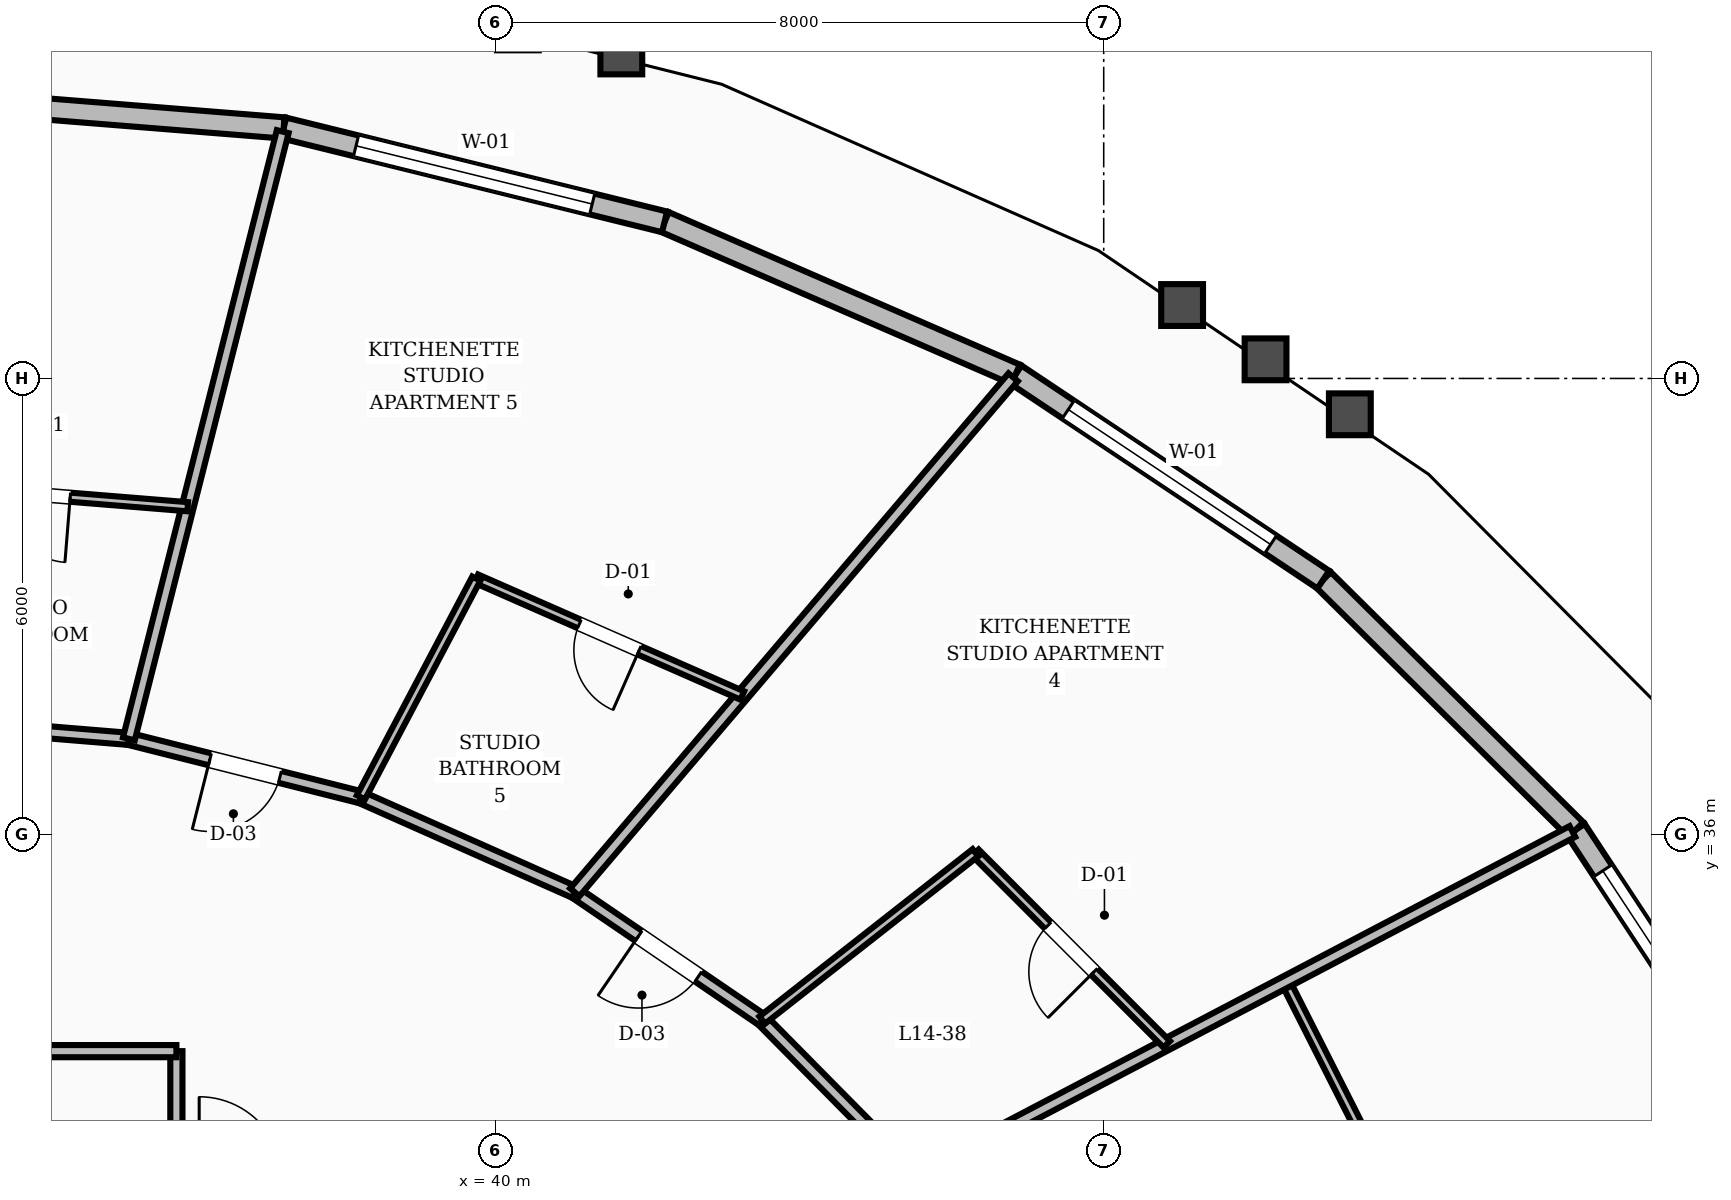
"""IFC4 building model, lengths in metres.
Left out: names, types, materials, properties, quantities, classifications, styles, units other than length and angle.
Written with IfcOpenShell. Run it as: python <this file> out.ifc"""

import sys

from ifc_helpers import new_model, si_unit, direction, frame, frame_2d, origin, place, context, subcontext, project, spatial, rectangle, extrude, element, fill, save


model = new_model("IFC4")
c1 = context("Model", 3, precision=1e-05, world=origin(), true_north=direction((0.0, 1.0)))
c2 = subcontext(c1, "Body", "Model", "MODEL_VIEW")
j1 = project(units=[si_unit("LENGTHUNIT", "METRE"), si_unit("PLANEANGLEUNIT", "RADIAN")], contexts=[c1])
p1 = place(None, origin())
s1 = spatial("IfcSite", under=j1, at=p1, CompositionType="ELEMENT")
p2 = place(p1, origin())
s2 = spatial("IfcBuilding", under=s1, at=p2, CompositionType="ELEMENT")
p3 = place(p2, frame((0.0, 0.0, 59.2)))
s3 = spatial("IfcBuildingStorey", under=s2, at=p3, CompositionType="ELEMENT", Elevation=59.2)
p4 = place(p3, frame((56.679, 32.309, 0.0), z_axis=(0.0, 0.0, 1.0), x_axis=(-0.549434846356, 0.835536563898, 0.0)))
e1 = element("IfcWall", 1, at=p4, inside=s3, PredefinedType="STANDARD", context=c2, shape_type="SweptSolid", body=[
    extrude(rectangle(XDim=4.493, YDim=0.28, at=frame_2d((2.247, 0.0))), origin(), (0.0, 0.0, 1.0), 2.65),
])
p5 = place(p4, frame((0.646, 0.0, 0.8)))
e2 = element("IfcOpeningElement", 2, at=p5, cuts=e1, PredefinedType="OPENING", context=c2, shape_type="SweptSolid", body=[
    extrude(rectangle(XDim=3.2, YDim=1.65, at=frame_2d((1.6, 0.825))), frame((0.0, 0.15, 0.0), z_axis=(0.0, -1.0, 0.0), x_axis=(1.0, 0.0, 0.0)), (0.0, 0.0, 1.0), 0.3),
])
p6 = place(p3, frame((54.211, 36.063, 0.0), z_axis=(0.0, 0.0, 1.0), x_axis=(-0.710492625766, 0.70370464595, 0.0)))
e3 = element("IfcWall", 3, at=p6, inside=s3, PredefinedType="STANDARD", context=c2, shape_type="SweptSolid", body=[
    extrude(rectangle(XDim=4.676, YDim=0.28, at=frame_2d((2.338, 0.0))), origin(), (0.0, 0.0, 1.0), 2.65),
])
p7 = place(p3, frame((50.889, 39.353, 0.0), z_axis=(0.0, 0.0, 1.0), x_axis=(-0.83189587854, 0.5549317501, 0.0)))
e4 = element("IfcWall", 4, at=p7, inside=s3, PredefinedType="STANDARD", context=c2, shape_type="SweptSolid", body=[
    extrude(rectangle(XDim=4.866, YDim=0.28, at=frame_2d((2.433, 0.0))), origin(), (0.0, 0.0, 1.0), 2.65),
])
p8 = place(p7, frame((0.833, 0.0, 0.8)))
e5 = element("IfcOpeningElement", 5, at=p8, cuts=e4, PredefinedType="OPENING", context=c2, shape_type="SweptSolid", body=[
    extrude(rectangle(XDim=3.2, YDim=1.65, at=frame_2d((1.6, 0.825))), frame((0.0, 0.15, 0.0), z_axis=(0.0, -1.0, 0.0), x_axis=(1.0, 0.0, 0.0)), (0.0, 0.0, 1.0), 0.3),
])
p9 = place(p3, frame((46.841, 42.053, 0.0), z_axis=(0.0, 0.0, 1.0), x_axis=(-0.917190263452, 0.398449520804, 0.0)))
e6 = element("IfcWall", 6, at=p9, inside=s3, PredefinedType="STANDARD", context=c2, shape_type="SweptSolid", body=[
    extrude(rectangle(XDim=5.035, YDim=0.28, at=frame_2d((2.518, 0.0))), origin(), (0.0, 0.0, 1.0), 2.65),
])
p10 = place(p3, frame((42.222, 44.06, 0.0), z_axis=(0.0, 0.0, 1.0), x_axis=(-0.970919369657, 0.239406720089, 0.0)))
e7 = element("IfcWall", 7, at=p10, inside=s3, PredefinedType="STANDARD", context=c2, shape_type="SweptSolid", body=[
    extrude(rectangle(XDim=5.161, YDim=0.28, at=frame_2d((2.581, 0.0))), origin(), (0.0, 0.0, 1.0), 2.65),
])
p11 = place(p10, frame((0.981, 0.0, 0.8)))
e8 = element("IfcOpeningElement", 8, at=p11, cuts=e7, PredefinedType="OPENING", context=c2, shape_type="SweptSolid", body=[
    extrude(rectangle(XDim=3.2, YDim=1.65, at=frame_2d((1.6, 0.825))), frame((0.0, 0.15, 0.0), z_axis=(0.0, -1.0, 0.0), x_axis=(1.0, 0.0, 0.0)), (0.0, 0.0, 1.0), 0.3),
])
p12 = place(p3, frame((37.211, 45.295, 0.0), z_axis=(0.0, 0.0, 1.0), x_axis=(-0.996810376731, 0.079806471181, 0.0)))
e9 = element("IfcWall", 9, at=p12, inside=s3, PredefinedType="STANDARD", context=c2, shape_type="SweptSolid", body=[
    extrude(rectangle(XDim=5.228, YDim=0.28, at=frame_2d((2.614, 0.0))), origin(), (0.0, 0.0, 1.0), 2.65),
])
p13 = place(p3, frame((35.8, 31.45, 0.0), z_axis=(0.0, 0.0, 1.0), x_axis=(0.0, 1.0, 0.0)))
e10 = element("IfcWall", 10, at=p13, inside=s3, PredefinedType="SOLIDWALL", context=c2, shape_type="SweptSolid", body=[
    extrude(rectangle(XDim=1.7, YDim=0.16, at=frame_2d((0.85, 0.0))), origin(), (0.0, 0.0, 1.0), 2.61),
])
p14 = place(p3, frame((28.2, 33.15, 0.0), z_axis=(0.0, 0.0, 1.0), x_axis=(1.0, 0.0, 0.0)))
e11 = element("IfcWall", 11, at=p14, inside=s3, PredefinedType="SOLIDWALL", context=c2, shape_type="SweptSolid", body=[
    extrude(rectangle(XDim=7.6, YDim=0.16, at=frame_2d((3.8, 0.0))), origin(), (0.0, 0.0, 1.0), 2.61),
])
p15 = place(p14, frame((3.2, 0.0, 0.0)))
e12 = element("IfcOpeningElement", 12, at=p15, cuts=e11, PredefinedType="OPENING", context=c2, shape_type="SweptSolid", body=[
    extrude(rectangle(XDim=1.2, YDim=2.1, at=frame_2d((0.6, 1.05))), frame((0.0, 0.09, 0.0), z_axis=(0.0, -1.0, 0.0), x_axis=(1.0, 0.0, 0.0)), (0.0, 0.0, 1.0), 0.18),
])
p16 = place(p3, frame((45.531, 31.51, 0.0), z_axis=(0.0, 0.0, 1.0), x_axis=(-0.702811997, 0.711375636969, 0.0)))
e13 = element("IfcWall", 13, at=p16, inside=s3, PredefinedType="SOLIDWALL", context=c2, shape_type="SweptSolid", body=[
    extrude(rectangle(XDim=2.879, YDim=0.16, at=frame_2d((1.44, 0.0))), origin(), (0.0, 0.0, 1.0), 2.61),
])
p17 = place(p3, frame((43.508, 33.559, 0.0), z_axis=(0.0, 0.0, 1.0), x_axis=(-0.826293096206, 0.56324037423, 0.0)))
e14 = element("IfcWall", 14, at=p17, inside=s3, PredefinedType="SOLIDWALL", context=c2, shape_type="SweptSolid", body=[
    extrude(rectangle(XDim=2.985, YDim=0.16, at=frame_2d((1.492, 0.0))), origin(), (0.0, 0.0, 1.0), 2.61),
])
p18 = place(p17, frame((1.017, 0.0, 0.0)))
e15 = element("IfcOpeningElement", 15, at=p18, cuts=e14, PredefinedType="OPENING", context=c2, shape_type="SweptSolid", body=[
    extrude(rectangle(XDim=0.95, YDim=2.1, at=frame_2d((0.475, 1.05))), frame((0.0, 0.09, 0.0), z_axis=(0.0, -1.0, 0.0), x_axis=(1.0, 0.0, 0.0)), (0.0, 0.0, 1.0), 0.18),
])
p19 = place(p3, frame((41.041, 35.24, 0.0), z_axis=(0.0, 0.0, 1.0), x_axis=(-0.913952123493, 0.405822024984, 0.0)))
e16 = element("IfcWall", 16, at=p19, inside=s3, PredefinedType="SOLIDWALL", context=c2, shape_type="SweptSolid", body=[
    extrude(rectangle(XDim=3.078, YDim=0.16, at=frame_2d((1.539, 0.0))), origin(), (0.0, 0.0, 1.0), 2.61),
])
p20 = place(p3, frame((38.228, 36.489, 0.0), z_axis=(0.0, 0.0, 1.0), x_axis=(-0.969689238064, 0.244341526521, 0.0)))
e17 = element("IfcWall", 17, at=p20, inside=s3, PredefinedType="SOLIDWALL", context=c2, shape_type="SweptSolid", body=[
    extrude(rectangle(XDim=3.148, YDim=0.16, at=frame_2d((1.574, 0.0))), origin(), (0.0, 0.0, 1.0), 2.61),
])
p21 = place(p20, frame((1.099, 0.0, 0.0)))
e18 = element("IfcOpeningElement", 18, at=p21, cuts=e17, PredefinedType="OPENING", context=c2, shape_type="SweptSolid", body=[
    extrude(rectangle(XDim=0.95, YDim=2.1, at=frame_2d((0.475, 1.05))), frame((0.0, 0.09, 0.0), z_axis=(0.0, -1.0, 0.0), x_axis=(1.0, 0.0, 0.0)), (0.0, 0.0, 1.0), 0.18),
])
p22 = place(p3, frame((35.175, 37.258, 0.0), z_axis=(0.0, 0.0, 1.0), x_axis=(-0.996669377538, 0.081548463373, 0.0)))
e19 = element("IfcWall", 19, at=p22, inside=s3, PredefinedType="SOLIDWALL", context=c2, shape_type="SweptSolid", body=[
    extrude(rectangle(XDim=3.185, YDim=0.16, at=frame_2d((1.593, 0.0))), origin(), (0.0, 0.0, 1.0), 2.61),
])
p23 = place(p3, frame((53.695, 27.532, 0.0), z_axis=(0.0, 0.0, 1.0), x_axis=(-0.45148033716, 0.892281068474, 0.0)))
e20 = element("IfcWall", 20, at=p23, inside=s3, PredefinedType="PARTITIONING", context=c2, shape_type="SweptSolid", body=[
    extrude(rectangle(XDim=7.315, YDim=0.12, at=frame_2d((3.658, 0.0))), origin(), (0.0, 0.0, 1.0), 2.61),
])
p24 = place(p23, frame((3.183, 0.0, 0.0)))
e21 = element("IfcOpeningElement", 21, at=p24, cuts=e20, PredefinedType="OPENING", context=c2, shape_type="SweptSolid", body=[
    extrude(rectangle(XDim=0.95, YDim=2.1, at=frame_2d((0.475, 1.05))), frame((0.0, 0.07, 0.0), z_axis=(0.0, -1.0, 0.0), x_axis=(1.0, 0.0, 0.0)), (0.0, 0.0, 1.0), 0.14),
])
p25 = place(p3, frame((45.531, 31.51, 0.0), z_axis=(0.0, 0.0, 1.0), x_axis=(0.885565291544, 0.464514923778, 0.0)))
e22 = element("IfcWall", 22, at=p25, inside=s3, PredefinedType="SOLIDWALL", context=c2, shape_type="SweptSolid", body=[
    extrude(rectangle(XDim=9.751, YDim=0.16, at=frame_2d((4.875, 0.0))), origin(), (0.0, 0.0, 1.0), 2.61),
])
p26 = place(p3, frame((48.83, 33.24, 0.0), z_axis=(0.0, 0.0, 1.0), x_axis=(-0.706661122184, 0.707552159486, 0.0)))
e23 = element("IfcWall", 23, at=p26, inside=s3, PredefinedType="PARTITIONING", context=c2, shape_type="SweptSolid", body=[
    extrude(rectangle(XDim=3.562, YDim=0.12, at=frame_2d((1.781, 0.0))), origin(), (0.0, 0.0, 1.0), 2.61),
])
p27 = place(p26, frame((1.351, 0.0, 0.0)))
e24 = element("IfcOpeningElement", 24, at=p27, cuts=e23, PredefinedType="OPENING", context=c2, shape_type="SweptSolid", body=[
    extrude(rectangle(XDim=0.86, YDim=2.1, at=frame_2d((0.43, 1.05))), frame((0.0, 0.07, 0.0), z_axis=(0.0, -1.0, 0.0), x_axis=(1.0, 0.0, 0.0)), (0.0, 0.0, 1.0), 0.14),
])
p28 = place(p3, frame((43.508, 33.559, 0.0), z_axis=(0.0, 0.0, 1.0), x_axis=(0.786586722527, 0.617479819868, 0.0)))
e25 = element("IfcWall", 25, at=p28, inside=s3, PredefinedType="PARTITIONING", context=c2, shape_type="SweptSolid", body=[
    extrude(rectangle(XDim=3.566, YDim=0.12, at=frame_2d((1.783, 0.0))), origin(), (0.0, 0.0, 1.0), 2.61),
])
p29 = place(p3, frame((41.041, 35.24, 0.0), z_axis=(0.0, 0.0, 1.0), x_axis=(0.648157225864, 0.761506540064, 0.0)))
e26 = element("IfcWall", 26, at=p29, inside=s3, PredefinedType="SOLIDWALL", context=c2, shape_type="SweptSolid", body=[
    extrude(rectangle(XDim=8.898, YDim=0.16, at=frame_2d((4.449, 0.0))), origin(), (0.0, 0.0, 1.0), 2.61),
])
p30 = place(p3, frame((43.245, 37.829, 0.0), z_axis=(0.0, 0.0, 1.0), x_axis=(-0.915586098947, 0.402121990712, 0.0)))
e27 = element("IfcWall", 27, at=p30, inside=s3, PredefinedType="PARTITIONING", context=c2, shape_type="SweptSolid", body=[
    extrude(rectangle(XDim=3.822, YDim=0.12, at=frame_2d((1.911, 0.0))), origin(), (0.0, 0.0, 1.0), 2.61),
])
p31 = place(p30, frame((1.481, 0.0, 0.0)))
e28 = element("IfcOpeningElement", 28, at=p31, cuts=e27, PredefinedType="OPENING", context=c2, shape_type="SweptSolid", body=[
    extrude(rectangle(XDim=0.86, YDim=2.1, at=frame_2d((0.43, 1.05))), frame((0.0, 0.07, 0.0), z_axis=(0.0, -1.0, 0.0), x_axis=(1.0, 0.0, 0.0)), (0.0, 0.0, 1.0), 0.14),
])
p32 = place(p3, frame((38.228, 36.489, 0.0), z_axis=(0.0, 0.0, 1.0), x_axis=(0.466680348687, 0.884426058045, 0.0)))
e29 = element("IfcWall", 29, at=p32, inside=s3, PredefinedType="PARTITIONING", context=c2, shape_type="SweptSolid", body=[
    extrude(rectangle(XDim=3.253, YDim=0.12, at=frame_2d((1.626, 0.0))), origin(), (0.0, 0.0, 1.0), 2.61),
])
p33 = place(p3, frame((35.175, 37.258, 0.0), z_axis=(0.0, 0.0, 1.0), x_axis=(0.24564316936, 0.969360321731, 0.0)))
e30 = element("IfcWall", 30, at=p33, inside=s3, PredefinedType="SOLIDWALL", context=c2, shape_type="SweptSolid", body=[
    extrude(rectangle(XDim=8.241, YDim=0.16, at=frame_2d((4.121, 0.0))), origin(), (0.0, 0.0, 1.0), 2.61),
])
p34 = place(p3, frame((35.949, 40.312, 0.0), z_axis=(0.0, 0.0, 1.0), x_axis=(-0.996740977856, 0.080668600223, 0.0)))
e31 = element("IfcWall", 31, at=p34, inside=s3, PredefinedType="PARTITIONING", context=c2, shape_type="SweptSolid", body=[
    extrude(rectangle(XDim=3.962, YDim=0.12, at=frame_2d((1.981, 0.0))), origin(), (0.0, 0.0, 1.0), 2.61),
])
p35 = place(p34, frame((1.551, 0.0, 0.0)))
e32 = element("IfcOpeningElement", 32, at=p35, cuts=e31, PredefinedType="OPENING", context=c2, shape_type="SweptSolid", body=[
    extrude(rectangle(XDim=0.86, YDim=2.1, at=frame_2d((0.43, 1.05))), frame((0.0, 0.07, 0.0), z_axis=(0.0, -1.0, 0.0), x_axis=(1.0, 0.0, 0.0)), (0.0, 0.0, 1.0), 0.14),
])
p36 = place(p5, origin())
e33 = element("IfcWindow", 33, at=p36, inside=s3, PartitioningType="SINGLE_PANEL", PredefinedType="WINDOW", context=c2, shape_type="SweptSolid", body=[
    extrude(rectangle(XDim=3.2, YDim=1.65, at=frame_2d((1.6, 0.825))), frame((0.0, 0.03, 0.0), z_axis=(0.0, -1.0, 0.0), x_axis=(1.0, 0.0, 0.0)), (0.0, 0.0, 1.0), 0.06),
])
fill(e2, e33)
p37 = place(p8, origin())
e34 = element("IfcWindow", 34, at=p37, inside=s3, PartitioningType="SINGLE_PANEL", PredefinedType="WINDOW", context=c2, shape_type="SweptSolid", body=[
    extrude(rectangle(XDim=3.2, YDim=1.65, at=frame_2d((1.6, 0.825))), frame((0.0, 0.03, 0.0), z_axis=(0.0, -1.0, 0.0), x_axis=(1.0, 0.0, 0.0)), (0.0, 0.0, 1.0), 0.06),
])
fill(e5, e34)
p38 = place(p11, origin())
e35 = element("IfcWindow", 35, at=p38, inside=s3, PartitioningType="SINGLE_PANEL", PredefinedType="WINDOW", context=c2, shape_type="SweptSolid", body=[
    extrude(rectangle(XDim=3.2, YDim=1.65, at=frame_2d((1.6, 0.825))), frame((0.0, 0.03, 0.0), z_axis=(0.0, -1.0, 0.0), x_axis=(1.0, 0.0, 0.0)), (0.0, 0.0, 1.0), 0.06),
])
fill(e8, e35)
p39 = place(p27, origin())
e36 = element("IfcDoor", 36, at=p39, inside=s3, OperationType="SINGLE_SWING_LEFT", PredefinedType="DOOR", context=c2, shape_type="SweptSolid", body=[
    extrude(rectangle(XDim=0.86, YDim=2.1, at=frame_2d((0.43, 1.05))), frame((0.0, 0.025, 0.0), z_axis=(0.0, -1.0, 0.0), x_axis=(1.0, 0.0, 0.0)), (0.0, 0.0, 1.0), 0.05),
])
fill(e24, e36)
p40 = place(p18, origin())
e37 = element("IfcDoor", 37, at=p40, inside=s3, OperationType="SINGLE_SWING_RIGHT", PredefinedType="DOOR", context=c2, shape_type="SweptSolid", body=[
    extrude(rectangle(XDim=0.95, YDim=2.1, at=frame_2d((0.475, 1.05))), frame((0.0, 0.025, 0.0), z_axis=(0.0, -1.0, 0.0), x_axis=(1.0, 0.0, 0.0)), (0.0, 0.0, 1.0), 0.05),
])
fill(e15, e37)
p41 = place(p31, origin())
e38 = element("IfcDoor", 38, at=p41, inside=s3, OperationType="SINGLE_SWING_LEFT", PredefinedType="DOOR", context=c2, shape_type="SweptSolid", body=[
    extrude(rectangle(XDim=0.86, YDim=2.1, at=frame_2d((0.43, 1.05))), frame((0.0, 0.025, 0.0), z_axis=(0.0, -1.0, 0.0), x_axis=(1.0, 0.0, 0.0)), (0.0, 0.0, 1.0), 0.05),
])
fill(e28, e38)
p42 = place(p21, origin())
e39 = element("IfcDoor", 39, at=p42, inside=s3, OperationType="SINGLE_SWING_RIGHT", PredefinedType="DOOR", context=c2, shape_type="SweptSolid", body=[
    extrude(rectangle(XDim=0.95, YDim=2.1, at=frame_2d((0.475, 1.05))), frame((0.0, 0.025, 0.0), z_axis=(0.0, -1.0, 0.0), x_axis=(1.0, 0.0, 0.0)), (0.0, 0.0, 1.0), 0.05),
])
fill(e18, e39)
p43 = place(p35, origin())
e40 = element("IfcDoor", 40, at=p43, inside=s3, OperationType="SINGLE_SWING_LEFT", PredefinedType="DOOR", context=c2, shape_type="SweptSolid", body=[
    extrude(rectangle(XDim=0.86, YDim=2.1, at=frame_2d((0.43, 1.05))), frame((0.0, 0.025, 0.0), z_axis=(0.0, -1.0, 0.0), x_axis=(1.0, 0.0, 0.0)), (0.0, 0.0, 1.0), 0.05),
])
fill(e32, e40)
save(model, sys.argv[1])
